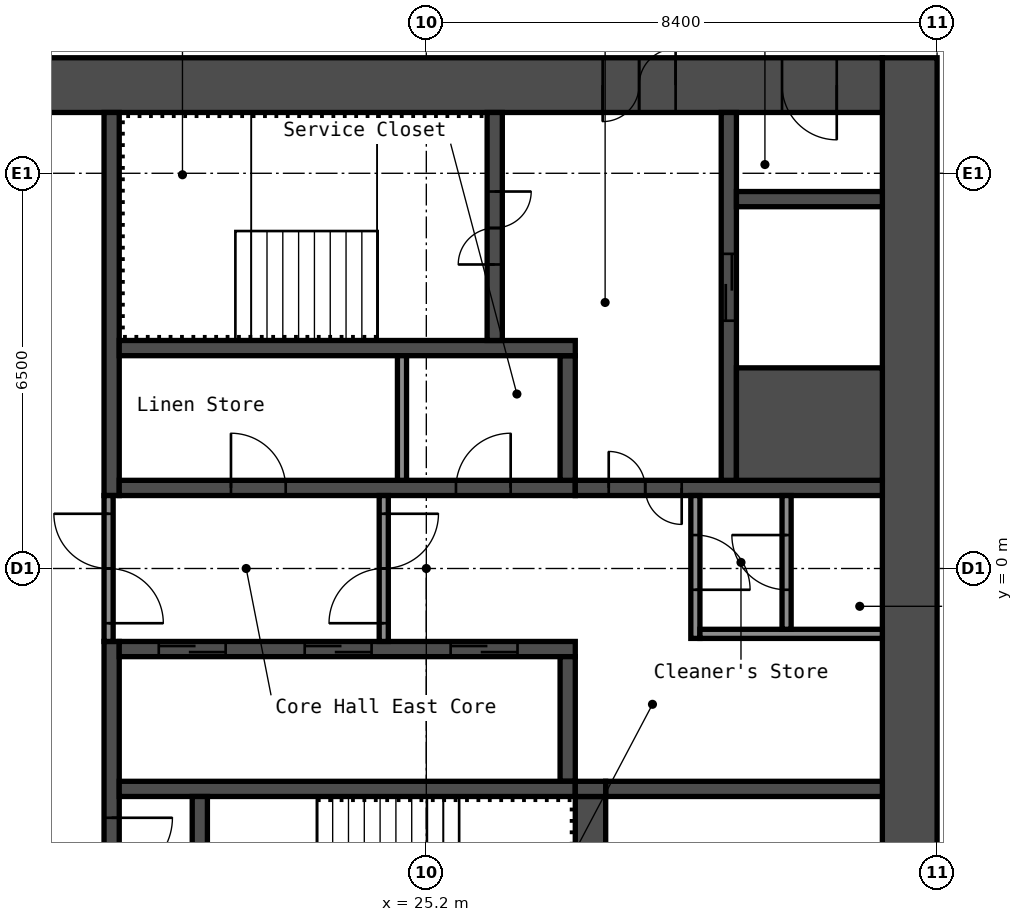
"""IFC4 building model, lengths in metres.
Left out: names, types, materials, properties, quantities, classifications, styles, units other than length and angle.
Written with IfcOpenShell. Run it as: python <this file> out.ifc"""

import sys

from ifc_helpers import new_model, si_unit, direction, frame, frame_2d, origin, place, context, subcontext, project, spatial, rectangle, extrude, element, fill, save


model = new_model("IFC4")
c1 = context("Model", 3, precision=1e-05, world=origin(), true_north=direction((0.0, 1.0)))
c2 = subcontext(c1, "Body", "Model", "MODEL_VIEW")
j1 = project(units=[si_unit("LENGTHUNIT", "METRE"), si_unit("PLANEANGLEUNIT", "RADIAN")], contexts=[c1])
p1 = place(None, origin())
s1 = spatial("IfcSite", under=j1, at=p1, CompositionType="ELEMENT")
p2 = place(p1, origin())
s2 = spatial("IfcBuilding", under=s1, at=p2, CompositionType="ELEMENT")
p3 = place(p2, frame((0.0, 0.0, 215.4)))
s3 = spatial("IfcBuildingStorey", under=s2, at=p3, CompositionType="ELEMENT", Elevation=215.4)
p4 = place(p3, frame((33.15, -8.4, 0.0), z_axis=(0.0, 0.0, 1.0), x_axis=(0.0, 1.0, 0.0)))
e1 = element("IfcWall", 1, at=p4, inside=s3, PredefinedType="SHEAR", context=c2, shape_type="SweptSolid", body=[
    extrude(rectangle(XDim=16.8, YDim=0.9, at=frame_2d((8.4, 0.0))), origin(), (0.0, 0.0, 1.0), 2.75),
])
p5 = place(p3, frame((17.7, 7.95, 0.0), z_axis=(0.0, 0.0, 1.0), x_axis=(1.0, 0.0, 0.0)))
e2 = element("IfcWall", 2, at=p5, inside=s3, PredefinedType="SHEAR", context=c2, shape_type="SweptSolid", body=[
    extrude(rectangle(XDim=15.0, YDim=0.9, at=frame_2d((7.5, 0.0))), origin(), (0.0, 0.0, 1.0), 2.75),
])
p6 = place(p5, frame((10.4, 0.0, 0.0)))
e3 = element("IfcOpeningElement", 3, at=p6, cuts=e2, PredefinedType="OPENING", context=c2, shape_type="SweptSolid", body=[
    extrude(rectangle(XDim=1.2, YDim=2.1, at=frame_2d((0.6, 1.05))), frame((0.0, 0.46, 0.0), z_axis=(0.0, -1.0, 0.0), x_axis=(1.0, 0.0, 0.0)), (0.0, 0.0, 1.0), 0.92),
])
p7 = place(p5, frame((13.35, 0.0, 0.0)))
e4 = element("IfcOpeningElement", 4, at=p7, cuts=e2, PredefinedType="OPENING", context=c2, shape_type="SweptSolid", body=[
    extrude(rectangle(XDim=0.9, YDim=2.1, at=frame_2d((0.45, 1.05))), frame((0.0, 0.46, 0.0), z_axis=(0.0, -1.0, 0.0), x_axis=(1.0, 0.0, 0.0)), (0.0, 0.0, 1.0), 0.92),
])
p8 = place(p3, frame((20.025, 1.2, 0.0), z_axis=(0.0, 0.0, 1.0), x_axis=(0.0, 1.0, 0.0)))
e5 = element("IfcWall", 5, at=p8, inside=s3, PredefinedType="SHEAR", context=c2, shape_type="SweptSolid", body=[
    extrude(rectangle(XDim=6.3, YDim=0.25, at=frame_2d((3.15, 0.0))), origin(), (0.0, 0.0, 1.0), 2.75),
])
p9 = place(p3, frame((20.025, -7.5, 0.0), z_axis=(0.0, 0.0, 1.0), x_axis=(0.0, 1.0, 0.0)))
e6 = element("IfcWall", 6, at=p9, inside=s3, PredefinedType="SHEAR", context=c2, shape_type="SweptSolid", body=[
    extrude(rectangle(XDim=6.3, YDim=0.25, at=frame_2d((3.15, 0.0))), origin(), (0.0, 0.0, 1.0), 2.75),
])
p10 = place(p9, frame((2.4, 0.0, 0.0)))
e7 = element("IfcOpeningElement", 7, at=p10, cuts=e6, PredefinedType="OPENING", context=c2, shape_type="SweptSolid", body=[
    extrude(rectangle(XDim=1.0, YDim=2.1, at=frame_2d((0.5, 1.05))), frame((0.0, 0.135, 0.0), z_axis=(0.0, -1.0, 0.0), x_axis=(1.0, 0.0, 0.0)), (0.0, 0.0, 1.0), 0.27),
])
p11 = place(p3, frame((20.15, 1.325, 0.0), z_axis=(0.0, 0.0, 1.0), x_axis=(1.0, 0.0, 0.0)))
e8 = element("IfcWall", 8, at=p11, inside=s3, PredefinedType="SHEAR", context=c2, shape_type="SweptSolid", body=[
    extrude(rectangle(XDim=7.5, YDim=0.25, at=frame_2d((3.75, 0.0))), origin(), (0.0, 0.0, 1.0), 2.75),
])
p12 = place(p11, frame((1.837, 0.0, 0.0)))
e9 = element("IfcOpeningElement", 9, at=p12, cuts=e8, PredefinedType="OPENING", context=c2, shape_type="SweptSolid", body=[
    extrude(rectangle(XDim=0.9, YDim=2.1, at=frame_2d((0.45, 1.05))), frame((0.0, 0.135, 0.0), z_axis=(0.0, -1.0, 0.0), x_axis=(1.0, 0.0, 0.0)), (0.0, 0.0, 1.0), 0.27),
])
p13 = place(p11, frame((5.538, 0.0, 0.0)))
e10 = element("IfcOpeningElement", 10, at=p13, cuts=e8, PredefinedType="OPENING", context=c2, shape_type="SweptSolid", body=[
    extrude(rectangle(XDim=0.9, YDim=2.1, at=frame_2d((0.45, 1.05))), frame((0.0, 0.135, 0.0), z_axis=(0.0, -1.0, 0.0), x_axis=(1.0, 0.0, 0.0)), (0.0, 0.0, 1.0), 0.27),
])
p14 = place(p3, frame((27.525, 1.45, 0.0), z_axis=(0.0, 0.0, 1.0), x_axis=(0.0, 1.0, 0.0)))
e11 = element("IfcWall", 11, at=p14, inside=s3, PredefinedType="SHEAR", context=c2, shape_type="SweptSolid", body=[
    extrude(rectangle(XDim=2.05, YDim=0.25, at=frame_2d((1.025, 0.0))), origin(), (0.0, 0.0, 1.0), 2.75),
])
p15 = place(p3, frame((20.15, 3.625, 0.0), z_axis=(0.0, 0.0, 1.0), x_axis=(1.0, 0.0, 0.0)))
e12 = element("IfcWall", 12, at=p15, inside=s3, PredefinedType="SHEAR", context=c2, shape_type="SweptSolid", body=[
    extrude(rectangle(XDim=7.5, YDim=0.25, at=frame_2d((3.75, 0.0))), origin(), (0.0, 0.0, 1.0), 2.75),
])
p16 = place(p3, frame((26.325, 3.75, 0.0), z_axis=(0.0, 0.0, 1.0), x_axis=(0.0, 1.0, 0.0)))
e13 = element("IfcWall", 13, at=p16, inside=s3, PredefinedType="SHEAR", context=c2, shape_type="SweptSolid", body=[
    extrude(rectangle(XDim=3.75, YDim=0.25, at=frame_2d((1.875, 0.0))), origin(), (0.0, 0.0, 1.0), 2.75),
])
p17 = place(p16, frame((1.25, 0.0, 0.0)))
e14 = element("IfcOpeningElement", 14, at=p17, cuts=e13, PredefinedType="OPENING", context=c2, shape_type="SweptSolid", body=[
    extrude(rectangle(XDim=1.2, YDim=2.1, at=frame_2d((0.6, 1.05))), frame((0.0, 0.135, 0.0), z_axis=(0.0, -1.0, 0.0), x_axis=(1.0, 0.0, 0.0)), (0.0, 0.0, 1.0), 0.27),
])
p18 = place(p3, frame((27.65, 1.325, 0.0), z_axis=(0.0, 0.0, 1.0), x_axis=(1.0, 0.0, 0.0)))
e15 = element("IfcWall", 15, at=p18, inside=s3, PredefinedType="SHEAR", context=c2, shape_type="SweptSolid", body=[
    extrude(rectangle(XDim=5.05, YDim=0.25, at=frame_2d((2.525, 0.0))), origin(), (0.0, 0.0, 1.0), 2.75),
])
p19 = place(p18, frame((0.55, 0.0, 0.0)))
e16 = element("IfcOpeningElement", 16, at=p19, cuts=e15, PredefinedType="OPENING", context=c2, shape_type="SweptSolid", body=[
    extrude(rectangle(XDim=1.2, YDim=2.1, at=frame_2d((0.6, 1.05))), frame((0.0, 0.135, 0.0), z_axis=(0.0, -1.0, 0.0), x_axis=(1.0, 0.0, 0.0)), (0.0, 0.0, 1.0), 0.27),
])
p20 = place(p3, frame((30.175, 1.45, 0.0), z_axis=(0.0, 0.0, 1.0), x_axis=(0.0, 1.0, 0.0)))
e17 = element("IfcWall", 17, at=p20, inside=s3, PredefinedType="SHEAR", context=c2, shape_type="SweptSolid", body=[
    extrude(rectangle(XDim=6.05, YDim=0.25, at=frame_2d((3.025, 0.0))), origin(), (0.0, 0.0, 1.0), 2.75),
])
p21 = place(p20, frame((2.625, 0.0, 0.0)))
e18 = element("IfcOpeningElement", 18, at=p21, cuts=e17, PredefinedType="OPENING", context=c2, shape_type="SweptSolid", body=[
    extrude(rectangle(XDim=1.1, YDim=2.1, at=frame_2d((0.55, 1.05))), frame((0.0, 0.135, 0.0), z_axis=(0.0, -1.0, 0.0), x_axis=(1.0, 0.0, 0.0)), (0.0, 0.0, 1.0), 0.27),
])
p22 = place(p3, frame((30.3, 2.375, 0.0), z_axis=(0.0, 0.0, 1.0), x_axis=(1.0, 0.0, 0.0)))
e19 = element("IfcWall", 19, at=p22, inside=s3, PredefinedType="SHEAR", context=c2, shape_type="SweptSolid", body=[
    extrude(rectangle(XDim=2.4, YDim=1.85, at=frame_2d((1.2, 0.0))), origin(), (0.0, 0.0, 1.0), 2.75),
])
p23 = place(p3, frame((30.3, 6.075, 0.0), z_axis=(0.0, 0.0, 1.0), x_axis=(1.0, 0.0, 0.0)))
e20 = element("IfcWall", 20, at=p23, inside=s3, PredefinedType="SHEAR", context=c2, shape_type="SweptSolid", body=[
    extrude(rectangle(XDim=2.4, YDim=0.25, at=frame_2d((1.2, 0.0))), origin(), (0.0, 0.0, 1.0), 2.75),
])
p24 = place(p3, frame((20.15, -1.325, 0.0), z_axis=(0.0, 0.0, 1.0), x_axis=(1.0, 0.0, 0.0)))
e21 = element("IfcWall", 21, at=p24, inside=s3, PredefinedType="SHEAR", context=c2, shape_type="SweptSolid", body=[
    extrude(rectangle(XDim=7.5, YDim=0.25, at=frame_2d((3.75, 0.0))), origin(), (0.0, 0.0, 1.0), 2.75),
])
p25 = place(p24, frame((0.65, 0.0, 0.0)))
e22 = element("IfcOpeningElement", 22, at=p25, cuts=e21, PredefinedType="OPENING", context=c2, shape_type="SweptSolid", body=[
    extrude(rectangle(XDim=1.1, YDim=2.1, at=frame_2d((0.55, 1.05))), frame((0.0, 0.135, 0.0), z_axis=(0.0, -1.0, 0.0), x_axis=(1.0, 0.0, 0.0)), (0.0, 0.0, 1.0), 0.27),
])
p26 = place(p24, frame((3.05, 0.0, 0.0)))
e23 = element("IfcOpeningElement", 23, at=p26, cuts=e21, PredefinedType="OPENING", context=c2, shape_type="SweptSolid", body=[
    extrude(rectangle(XDim=1.1, YDim=2.1, at=frame_2d((0.55, 1.05))), frame((0.0, 0.135, 0.0), z_axis=(0.0, -1.0, 0.0), x_axis=(1.0, 0.0, 0.0)), (0.0, 0.0, 1.0), 0.27),
])
p27 = place(p24, frame((5.45, 0.0, 0.0)))
e24 = element("IfcOpeningElement", 24, at=p27, cuts=e21, PredefinedType="OPENING", context=c2, shape_type="SweptSolid", body=[
    extrude(rectangle(XDim=1.1, YDim=2.1, at=frame_2d((0.55, 1.05))), frame((0.0, 0.135, 0.0), z_axis=(0.0, -1.0, 0.0), x_axis=(1.0, 0.0, 0.0)), (0.0, 0.0, 1.0), 0.27),
])
p28 = place(p3, frame((27.525, -3.5, 0.0), z_axis=(0.0, 0.0, 1.0), x_axis=(0.0, 1.0, 0.0)))
e25 = element("IfcWall", 25, at=p28, inside=s3, PredefinedType="SHEAR", context=c2, shape_type="SweptSolid", body=[
    extrude(rectangle(XDim=2.05, YDim=0.25, at=frame_2d((1.025, 0.0))), origin(), (0.0, 0.0, 1.0), 2.75),
])
p29 = place(p3, frame((20.15, -3.625, 0.0), z_axis=(0.0, 0.0, 1.0), x_axis=(1.0, 0.0, 0.0)))
e26 = element("IfcWall", 26, at=p29, inside=s3, PredefinedType="SHEAR", context=c2, shape_type="SweptSolid", body=[
    extrude(rectangle(XDim=7.5, YDim=0.25, at=frame_2d((3.75, 0.0))), origin(), (0.0, 0.0, 1.0), 2.75),
])
p30 = place(p3, frame((21.475, -7.5, 0.0), z_axis=(0.0, 0.0, 1.0), x_axis=(0.0, 1.0, 0.0)))
e27 = element("IfcWall", 27, at=p30, inside=s3, PredefinedType="SHEAR", context=c2, shape_type="SweptSolid", body=[
    extrude(rectangle(XDim=3.75, YDim=0.25, at=frame_2d((1.875, 0.0))), origin(), (0.0, 0.0, 1.0), 2.75),
])
p31 = place(p30, frame((1.3, 0.0, 0.0)))
e28 = element("IfcOpeningElement", 28, at=p31, cuts=e27, PredefinedType="OPENING", context=c2, shape_type="SweptSolid", body=[
    extrude(rectangle(XDim=1.2, YDim=2.1, at=frame_2d((0.6, 1.05))), frame((0.0, 0.135, 0.0), z_axis=(0.0, -1.0, 0.0), x_axis=(1.0, 0.0, 0.0)), (0.0, 0.0, 1.0), 0.27),
])
p32 = place(p3, frame((27.9, -7.5, 0.0), z_axis=(0.0, 0.0, 1.0), x_axis=(0.0, 1.0, 0.0)))
e29 = element("IfcWall", 29, at=p32, inside=s3, PredefinedType="SHEAR", context=c2, shape_type="SweptSolid", body=[
    extrude(rectangle(XDim=3.75, YDim=0.5, at=frame_2d((1.875, 0.0))), origin(), (0.0, 0.0, 1.0), 2.75),
])
p33 = place(p3, frame((28.15, -3.625, 0.0), z_axis=(0.0, 0.0, 1.0), x_axis=(1.0, 0.0, 0.0)))
e30 = element("IfcWall", 30, at=p33, inside=s3, PredefinedType="SHEAR", context=c2, shape_type="SweptSolid", body=[
    extrude(rectangle(XDim=4.55, YDim=0.25, at=frame_2d((2.275, 0.0))), origin(), (0.0, 0.0, 1.0), 2.75),
])
p34 = place(p3, frame((27.65, -3.625, 0.0), z_axis=(0.0, 0.0, 1.0), x_axis=(1.0, 0.0, 0.0)))
e31 = element("IfcWall", 31, at=p34, inside=s3, PredefinedType="SHEAR", context=c2, shape_type="SweptSolid", body=[
    extrude(rectangle(XDim=0.5, YDim=0.25, at=frame_2d((0.25, 0.0))), origin(), (0.0, 0.0, 1.0), 2.75),
])
p35 = place(p3, frame((19.975, -1.2, 0.0), z_axis=(0.0, 0.0, 1.0), x_axis=(0.0, 1.0, 0.0)))
e32 = element("IfcWall", 32, at=p35, inside=s3, PredefinedType="PARTITIONING", context=c2, shape_type="SweptSolid", body=[
    extrude(rectangle(XDim=2.4, YDim=0.15, at=frame_2d((1.2, 0.0))), origin(), (0.0, 0.0, 1.0), 2.75),
])
p36 = place(p35, frame((0.3, 0.0, 0.0)))
e33 = element("IfcOpeningElement", 33, at=p36, cuts=e32, PredefinedType="OPENING", context=c2, shape_type="SweptSolid", body=[
    extrude(rectangle(XDim=1.8, YDim=2.1, at=frame_2d((0.9, 1.05))), frame((0.0, 0.085, 0.0), z_axis=(0.0, -1.0, 0.0), x_axis=(1.0, 0.0, 0.0)), (0.0, 0.0, 1.0), 0.17),
])
p37 = place(p3, frame((24.5, -1.2, 0.0), z_axis=(0.0, 0.0, 1.0), x_axis=(0.0, 1.0, 0.0)))
e34 = element("IfcWall", 34, at=p37, inside=s3, PredefinedType="PARTITIONING", context=c2, shape_type="SweptSolid", body=[
    extrude(rectangle(XDim=2.4, YDim=0.15, at=frame_2d((1.2, 0.0))), origin(), (0.0, 0.0, 1.0), 2.75),
])
p38 = place(p37, frame((0.3, 0.0, 0.0)))
e35 = element("IfcOpeningElement", 35, at=p38, cuts=e34, PredefinedType="OPENING", context=c2, shape_type="SweptSolid", body=[
    extrude(rectangle(XDim=1.8, YDim=2.1, at=frame_2d((0.9, 1.05))), frame((0.0, 0.085, 0.0), z_axis=(0.0, -1.0, 0.0), x_axis=(1.0, 0.0, 0.0)), (0.0, 0.0, 1.0), 0.17),
])
p39 = place(p3, frame((29.625, -1.15, 0.0), z_axis=(0.0, 0.0, 1.0), x_axis=(0.0, 1.0, 0.0)))
e36 = element("IfcWall", 36, at=p39, inside=s3, PredefinedType="PARTITIONING", context=c2, shape_type="SweptSolid", body=[
    extrude(rectangle(XDim=2.35, YDim=0.15, at=frame_2d((1.175, 0.0))), origin(), (0.0, 0.0, 1.0), 2.75),
])
p40 = place(p39, frame((0.8, 0.0, 0.0)))
e37 = element("IfcOpeningElement", 37, at=p40, cuts=e36, PredefinedType="OPENING", context=c2, shape_type="SweptSolid", body=[
    extrude(rectangle(XDim=0.9, YDim=2.1, at=frame_2d((0.45, 1.05))), frame((0.0, 0.085, 0.0), z_axis=(0.0, -1.0, 0.0), x_axis=(1.0, 0.0, 0.0)), (0.0, 0.0, 1.0), 0.17),
])
p41 = place(p3, frame((29.7, -1.075, 0.0), z_axis=(0.0, 0.0, 1.0), x_axis=(1.0, 0.0, 0.0)))
e38 = element("IfcWall", 38, at=p41, inside=s3, PredefinedType="PARTITIONING", context=c2, shape_type="SweptSolid", body=[
    extrude(rectangle(XDim=3.0, YDim=0.15, at=frame_2d((1.5, 0.0))), origin(), (0.0, 0.0, 1.0), 2.75),
])
p42 = place(p3, frame((31.125, -1.0, 0.0), z_axis=(0.0, 0.0, 1.0), x_axis=(0.0, 1.0, 0.0)))
e39 = element("IfcWall", 39, at=p42, inside=s3, PredefinedType="PARTITIONING", context=c2, shape_type="SweptSolid", body=[
    extrude(rectangle(XDim=2.2, YDim=0.15, at=frame_2d((1.1, 0.0))), origin(), (0.0, 0.0, 1.0), 2.75),
])
p43 = place(p42, frame((0.65, 0.0, 0.0)))
e40 = element("IfcOpeningElement", 40, at=p43, cuts=e39, PredefinedType="OPENING", context=c2, shape_type="SweptSolid", body=[
    extrude(rectangle(XDim=0.9, YDim=2.1, at=frame_2d((0.45, 1.05))), frame((0.0, 0.085, 0.0), z_axis=(0.0, -1.0, 0.0), x_axis=(1.0, 0.0, 0.0)), (0.0, 0.0, 1.0), 0.17),
])
p44 = place(p3, frame((24.8, 1.45, 0.0), z_axis=(0.0, 0.0, 1.0), x_axis=(0.0, 1.0, 0.0)))
e41 = element("IfcWall", 41, at=p44, inside=s3, PredefinedType="PARTITIONING", context=c2, shape_type="SweptSolid", body=[
    extrude(rectangle(XDim=2.05, YDim=0.15, at=frame_2d((1.025, 0.0))), origin(), (0.0, 0.0, 1.0), 2.75),
])
p45 = place(p6, origin())
e42 = element("IfcDoor", 42, at=p45, inside=s3, OperationType="DOUBLE_DOOR_SINGLE_SWING", PredefinedType="DOOR", context=c2, shape_type="SweptSolid", body=[
    extrude(rectangle(XDim=1.2, YDim=2.1, at=frame_2d((0.6, 1.05))), frame((0.0, 0.025, 0.0), z_axis=(0.0, -1.0, 0.0), x_axis=(1.0, 0.0, 0.0)), (0.0, 0.0, 1.0), 0.05),
])
fill(e3, e42)
p46 = place(p7, origin())
e43 = element("IfcDoor", 43, at=p46, inside=s3, OperationType="SINGLE_SWING_RIGHT", PredefinedType="DOOR", context=c2, shape_type="SweptSolid", body=[
    extrude(rectangle(XDim=0.9, YDim=2.1, at=frame_2d((0.45, 1.05))), frame((0.0, 0.025, 0.0), z_axis=(0.0, -1.0, 0.0), x_axis=(1.0, 0.0, 0.0)), (0.0, 0.0, 1.0), 0.05),
])
fill(e4, e43)
p47 = place(p17, origin())
e44 = element("IfcDoor", 44, at=p47, inside=s3, OperationType="DOUBLE_DOOR_SINGLE_SWING", PredefinedType="DOOR", context=c2, shape_type="SweptSolid", body=[
    extrude(rectangle(XDim=1.2, YDim=2.1, at=frame_2d((0.6, 1.05))), frame((0.0, 0.025, 0.0), z_axis=(0.0, -1.0, 0.0), x_axis=(1.0, 0.0, 0.0)), (0.0, 0.0, 1.0), 0.05),
])
fill(e14, e44)
p48 = place(p10, origin())
e45 = element("IfcDoor", 45, at=p48, inside=s3, OperationType="SINGLE_SWING_RIGHT", PredefinedType="DOOR", context=c2, shape_type="SweptSolid", body=[
    extrude(rectangle(XDim=1.0, YDim=2.1, at=frame_2d((0.5, 1.05))), frame((0.0, 0.025, 0.0), z_axis=(0.0, -1.0, 0.0), x_axis=(1.0, 0.0, 0.0)), (0.0, 0.0, 1.0), 0.05),
])
fill(e7, e45)
p49 = place(p19, origin())
e46 = element("IfcDoor", 46, at=p49, inside=s3, OperationType="DOUBLE_DOOR_SINGLE_SWING", PredefinedType="DOOR", context=c2, shape_type="SweptSolid", body=[
    extrude(rectangle(XDim=1.2, YDim=2.1, at=frame_2d((0.6, 1.05))), frame((0.0, 0.025, 0.0), z_axis=(0.0, -1.0, 0.0), x_axis=(1.0, 0.0, 0.0)), (0.0, 0.0, 1.0), 0.05),
])
fill(e16, e46)
p50 = place(p36, origin())
e47 = element("IfcDoor", 47, at=p50, inside=s3, OperationType="DOUBLE_DOOR_SINGLE_SWING", PredefinedType="DOOR", context=c2, shape_type="SweptSolid", body=[
    extrude(rectangle(XDim=1.8, YDim=2.1, at=frame_2d((0.9, 1.05))), frame((0.0, 0.025, 0.0), z_axis=(0.0, -1.0, 0.0), x_axis=(1.0, 0.0, 0.0)), (0.0, 0.0, 1.0), 0.05),
])
fill(e33, e47)
p51 = place(p38, origin())
e48 = element("IfcDoor", 48, at=p51, inside=s3, OperationType="DOUBLE_DOOR_SINGLE_SWING", PredefinedType="DOOR", context=c2, shape_type="SweptSolid", body=[
    extrude(rectangle(XDim=1.8, YDim=2.1, at=frame_2d((0.9, 1.05))), frame((0.0, 0.025, 0.0), z_axis=(0.0, -1.0, 0.0), x_axis=(1.0, 0.0, 0.0)), (0.0, 0.0, 1.0), 0.05),
])
fill(e35, e48)
p52 = place(p40, origin())
e49 = element("IfcDoor", 49, at=p52, inside=s3, OperationType="SINGLE_SWING_LEFT", PredefinedType="DOOR", context=c2, shape_type="SweptSolid", body=[
    extrude(rectangle(XDim=0.9, YDim=2.1, at=frame_2d((0.45, 1.05))), frame((0.0, 0.025, 0.0), z_axis=(0.0, -1.0, 0.0), x_axis=(1.0, 0.0, 0.0)), (0.0, 0.0, 1.0), 0.05),
])
fill(e37, e49)
p53 = place(p43, origin())
e50 = element("IfcDoor", 50, at=p53, inside=s3, OperationType="SINGLE_SWING_LEFT", PredefinedType="DOOR", context=c2, shape_type="SweptSolid", body=[
    extrude(rectangle(XDim=0.9, YDim=2.1, at=frame_2d((0.45, 1.05))), frame((0.0, 0.025, 0.0), z_axis=(0.0, -1.0, 0.0), x_axis=(1.0, 0.0, 0.0)), (0.0, 0.0, 1.0), 0.05),
])
fill(e40, e50)
p54 = place(p12, origin())
e51 = element("IfcDoor", 51, at=p54, inside=s3, OperationType="SINGLE_SWING_RIGHT", PredefinedType="DOOR", context=c2, shape_type="SweptSolid", body=[
    extrude(rectangle(XDim=0.9, YDim=2.1, at=frame_2d((0.45, 1.05))), frame((0.0, 0.025, 0.0), z_axis=(0.0, -1.0, 0.0), x_axis=(1.0, 0.0, 0.0)), (0.0, 0.0, 1.0), 0.05),
])
fill(e9, e51)
p55 = place(p13, origin())
e52 = element("IfcDoor", 52, at=p55, inside=s3, OperationType="SINGLE_SWING_LEFT", PredefinedType="DOOR", context=c2, shape_type="SweptSolid", body=[
    extrude(rectangle(XDim=0.9, YDim=2.1, at=frame_2d((0.45, 1.05))), frame((0.0, 0.025, 0.0), z_axis=(0.0, -1.0, 0.0), x_axis=(1.0, 0.0, 0.0)), (0.0, 0.0, 1.0), 0.05),
])
fill(e10, e52)
p56 = place(p25, origin())
e53 = element("IfcDoor", 53, at=p56, inside=s3, OperationType="DOUBLE_DOOR_SLIDING", PredefinedType="DOOR", context=c2, shape_type="SweptSolid", body=[
    extrude(rectangle(XDim=1.1, YDim=2.1, at=frame_2d((0.55, 1.05))), frame((0.0, 0.025, 0.0), z_axis=(0.0, -1.0, 0.0), x_axis=(1.0, 0.0, 0.0)), (0.0, 0.0, 1.0), 0.05),
])
fill(e22, e53)
p57 = place(p26, origin())
e54 = element("IfcDoor", 54, at=p57, inside=s3, OperationType="DOUBLE_DOOR_SLIDING", PredefinedType="DOOR", context=c2, shape_type="SweptSolid", body=[
    extrude(rectangle(XDim=1.1, YDim=2.1, at=frame_2d((0.55, 1.05))), frame((0.0, 0.025, 0.0), z_axis=(0.0, -1.0, 0.0), x_axis=(1.0, 0.0, 0.0)), (0.0, 0.0, 1.0), 0.05),
])
fill(e23, e54)
p58 = place(p27, origin())
e55 = element("IfcDoor", 55, at=p58, inside=s3, OperationType="DOUBLE_DOOR_SLIDING", PredefinedType="DOOR", context=c2, shape_type="SweptSolid", body=[
    extrude(rectangle(XDim=1.1, YDim=2.1, at=frame_2d((0.55, 1.05))), frame((0.0, 0.025, 0.0), z_axis=(0.0, -1.0, 0.0), x_axis=(1.0, 0.0, 0.0)), (0.0, 0.0, 1.0), 0.05),
])
fill(e24, e55)
p59 = place(p21, origin())
e56 = element("IfcDoor", 56, at=p59, inside=s3, OperationType="DOUBLE_DOOR_SLIDING", PredefinedType="DOOR", context=c2, shape_type="SweptSolid", body=[
    extrude(rectangle(XDim=1.1, YDim=2.1, at=frame_2d((0.55, 1.05))), frame((0.0, 0.025, 0.0), z_axis=(0.0, -1.0, 0.0), x_axis=(1.0, 0.0, 0.0)), (0.0, 0.0, 1.0), 0.05),
])
fill(e18, e56)
save(model, sys.argv[1])
